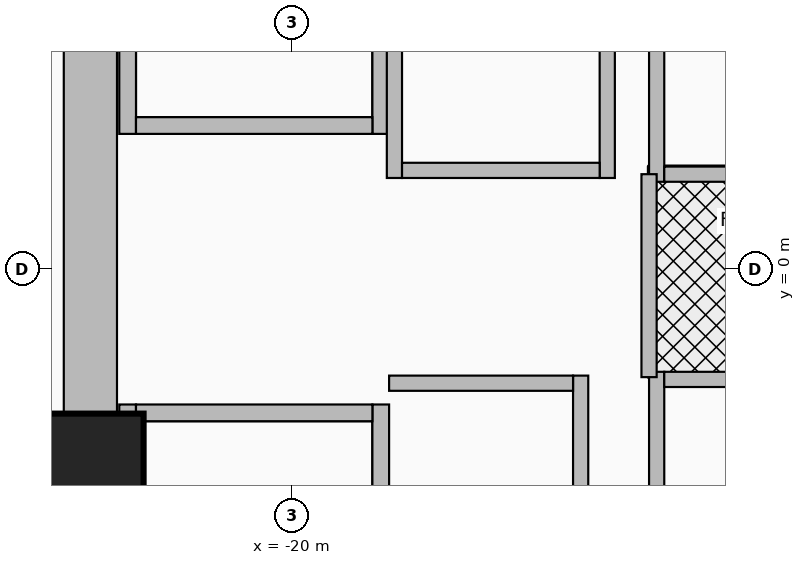
"""IFC4 building model, lengths in metres.
Left out: names, types, materials, properties, quantities, classifications, styles, units other than length and angle.
Written with IfcOpenShell. Run it as: python <this file> out.ifc"""

import sys

from ifc_helpers import new_model, si_unit, direction, frame, frame_2d, origin, origin_2d, place, context, subcontext, project, spatial, rectangle, extrude, source, transform, mapped, element, fill, save


model = new_model("IFC4")
c1 = context("Model", 3, precision=1e-05, world=origin(), true_north=direction((0.0, 1.0)))
c2 = subcontext(c1, "Body", "Model", "MODEL_VIEW")
j1 = project(units=[si_unit("LENGTHUNIT", "METRE"), si_unit("PLANEANGLEUNIT", "RADIAN")], contexts=[c1])
p1 = place(None, origin())
s1 = spatial("IfcSite", under=j1, at=p1, CompositionType="ELEMENT")
p2 = place(p1, origin())
s2 = spatial("IfcBuilding", under=s1, at=p2, CompositionType="ELEMENT")
p3 = place(p2, frame((0.0, 0.0, 20.8)))
s3 = spatial("IfcBuildingStorey", under=s2, at=p3, CompositionType="ELEMENT", Elevation=20.8)
for number, where, z_axis, x_axis in (
    (1, (-22.16, 1.78, 0.0), (0.0, 0.0, 1.0), (0.0, 1.0, 0.0)),
    (2, (-18.83, 1.78, 0.0), (0.0, 0.0, 1.0), (0.0, 1.0, 0.0)),
):
    element("IfcWall", number, at=place(p3, frame(where, z_axis=z_axis, x_axis=x_axis)), inside=s3, PredefinedType="SHEAR", context=c2, shape_type="SweptSolid", body=[
        extrude(rectangle(XDim=8.67, YDim=0.22, at=frame_2d((4.335, 0.0))), origin(), (0.0, 0.0, 1.0), 4.96),
    ])
p4 = place(p3, frame((-22.05, 1.89, 0.0), z_axis=(0.0, 0.0, 1.0), x_axis=(1.0, 0.0, 0.0)))
e3 = element("IfcWall", 3, at=p4, inside=s3, PredefinedType="SHEAR", context=c2, shape_type="SweptSolid", body=[
    extrude(rectangle(XDim=3.11, YDim=0.22, at=frame_2d((1.555, 0.0))), origin(), (0.0, 0.0, 1.0), 4.96),
])
p5 = place(p4, frame((1.0, 0.0, 0.0)))
e4 = element("IfcOpeningElement", 4, at=p5, cuts=e3, PredefinedType="OPENING", context=c2, shape_type="SweptSolid", body=[
    extrude(rectangle(XDim=1.1, YDim=2.15, at=frame_2d((0.55, 1.075))), frame((0.0, 0.125, 0.0), z_axis=(0.0, -1.0, 0.0), x_axis=(1.0, 0.0, 0.0)), (0.0, 0.0, 1.0), 0.25),
])
for number, where, z_axis, x_axis in (
    (5, (-22.16, -10.45, 0.0), (0.0, 0.0, 1.0), (0.0, 1.0, 0.0)),
    (6, (-18.83, -10.45, 0.0), (0.0, 0.0, 1.0), (0.0, 1.0, 0.0)),
):
    element("IfcWall", number, at=place(p3, frame(where, z_axis=z_axis, x_axis=x_axis)), inside=s3, PredefinedType="SHEAR", context=c2, shape_type="SweptSolid", body=[
        extrude(rectangle(XDim=8.67, YDim=0.22, at=frame_2d((4.335, 0.0))), origin(), (0.0, 0.0, 1.0), 4.96),
    ])
p6 = place(p3, frame((-22.05, -1.89, 0.0), z_axis=(0.0, 0.0, 1.0), x_axis=(1.0, 0.0, 0.0)))
e7 = element("IfcWall", 7, at=p6, inside=s3, PredefinedType="SHEAR", context=c2, shape_type="SweptSolid", body=[
    extrude(rectangle(XDim=3.11, YDim=0.22, at=frame_2d((1.555, 0.0))), origin(), (0.0, 0.0, 1.0), 4.96),
])
p7 = place(p6, frame((1.0, 0.0, 0.0)))
e8 = element("IfcOpeningElement", 8, at=p7, cuts=e7, PredefinedType="OPENING", context=c2, shape_type="SweptSolid", body=[
    extrude(rectangle(XDim=1.1, YDim=2.15, at=frame_2d((0.55, 1.075))), frame((0.0, 0.125, 0.0), z_axis=(0.0, -1.0, 0.0), x_axis=(1.0, 0.0, 0.0)), (0.0, 0.0, 1.0), 0.25),
])
p8 = place(p3, frame((-22.65, -11.15, 0.0), z_axis=(0.0, 0.0, 1.0), x_axis=(0.0, 1.0, 0.0)))
e9 = element("IfcWall", 9, at=p8, inside=s3, PredefinedType="SHEAR", context=c2, shape_type="SweptSolid", body=[
    extrude(rectangle(XDim=22.3, YDim=0.7, at=frame_2d((11.15, 0.0))), origin(), (0.0, 0.0, 1.0), 4.96),
])
m1 = source(origin(), c2, "Body", "SweptSolid", [
    extrude(rectangle(XDim=1.4, YDim=1.4, at=origin_2d()), origin(), (0.0, 0.0, 1.0), 5.2),
])
p9 = place(p3, frame((-22.65, -2.6, 0.0), z_axis=(0.0, 0.0, 1.0), x_axis=(1.0, 0.0, 0.0)))
e10 = element("IfcColumn", 10, at=p9, inside=s3, PredefinedType="COLUMN", context=c2, shape_type="MappedRepresentation", body=[
    mapped(m1, transform((0.0, 0.0, 0.0), x_axis=(1.0, 0.0, 0.0), y_axis=(0.0, 1.0, 0.0), z_axis=(0.0, 0.0, 1.0), scale=1.0)),
])
for number, where, z_axis, x_axis in (
    (11, (-18.65, 1.2, 0.0), (0.0, 0.0, 1.0), (0.0, 1.0, 0.0)),
    (12, (-15.85, 1.2, 0.0), (0.0, 0.0, 1.0), (0.0, 1.0, 0.0)),
):
    element("IfcWall", number, at=place(p3, frame(where, z_axis=z_axis, x_axis=x_axis)), inside=s3, PredefinedType="MOVABLE", context=c2, shape_type="SweptSolid", body=[
        extrude(rectangle(XDim=3.225, YDim=0.2, at=frame_2d((1.613, 0.0))), origin(), (0.0, 0.0, 1.0), 4.96),
    ])
p10 = place(p3, frame((-18.55, 1.3, 0.0), z_axis=(0.0, 0.0, 1.0), x_axis=(1.0, 0.0, 0.0)))
e13 = element("IfcWall", 13, at=p10, inside=s3, PredefinedType="MOVABLE", context=c2, shape_type="SweptSolid", body=[
    extrude(rectangle(XDim=2.6, YDim=0.2, at=frame_2d((1.3, 0.0))), origin(), (0.0, 0.0, 1.0), 4.96),
])
p11 = place(p10, frame((0.7, 0.0, 0.0)))
e14 = element("IfcOpeningElement", 14, at=p11, cuts=e13, PredefinedType="OPENING", context=c2, shape_type="SweptSolid", body=[
    extrude(rectangle(XDim=1.2, YDim=2.1, at=frame_2d((0.6, 1.05))), frame((0.0, 0.115, 0.0), z_axis=(0.0, -1.0, 0.0), x_axis=(1.0, 0.0, 0.0)), (0.0, 0.0, 1.0), 0.23),
])
p12 = place(p3, frame((-16.2, -4.6, 0.0), z_axis=(0.0, 0.0, 1.0), x_axis=(0.0, 1.0, 0.0)))
e15 = element("IfcWall", 15, at=p12, inside=s3, PredefinedType="MOVABLE", context=c2, shape_type="SweptSolid", body=[
    extrude(rectangle(XDim=3.2, YDim=0.2, at=frame_2d((1.6, 0.0))), origin(), (0.0, 0.0, 1.0), 4.96),
])
p13 = place(p3, frame((-18.72, -1.5, 0.0), z_axis=(0.0, 0.0, 1.0), x_axis=(1.0, 0.0, 0.0)))
e16 = element("IfcWall", 16, at=p13, inside=s3, PredefinedType="MOVABLE", context=c2, shape_type="SweptSolid", body=[
    extrude(rectangle(XDim=2.42, YDim=0.2, at=frame_2d((1.21, 0.0))), origin(), (0.0, 0.0, 1.0), 4.96),
])
p14 = place(p13, frame((0.61, 0.0, 0.0)))
e17 = element("IfcOpeningElement", 17, at=p14, cuts=e16, PredefinedType="OPENING", context=c2, shape_type="SweptSolid", body=[
    extrude(rectangle(XDim=1.2, YDim=2.1, at=frame_2d((0.6, 1.05))), frame((0.0, 0.115, 0.0), z_axis=(0.0, -1.0, 0.0), x_axis=(1.0, 0.0, 0.0)), (0.0, 0.0, 1.0), 0.23),
])
p15 = place(p3, frame((-15.2, 1.15, 0.0), z_axis=(0.0, 0.0, 1.0), x_axis=(0.0, 1.0, 0.0)))
e18 = element("IfcWall", 18, at=p15, inside=s3, PredefinedType="MOVABLE", context=c2, shape_type="SweptSolid", body=[
    extrude(rectangle(XDim=2.25, YDim=0.2, at=frame_2d((1.125, 0.0))), origin(), (0.0, 0.0, 1.0), 4.96),
])
p16 = place(p3, frame((-15.1, 1.25, 0.0), z_axis=(0.0, 0.0, 1.0), x_axis=(1.0, 0.0, 0.0)))
e19 = element("IfcWall", 19, at=p16, inside=s3, PredefinedType="MOVABLE", context=c2, shape_type="SweptSolid", body=[
    extrude(rectangle(XDim=1.92, YDim=0.2, at=frame_2d((0.96, 0.0))), origin(), (0.0, 0.0, 1.0), 4.96),
])
p17 = place(p3, frame((-15.2, -3.7, 0.0), z_axis=(0.0, 0.0, 1.0), x_axis=(0.0, 1.0, 0.0)))
e20 = element("IfcWall", 20, at=p17, inside=s3, PredefinedType="MOVABLE", context=c2, shape_type="SweptSolid", body=[
    extrude(rectangle(XDim=2.35, YDim=0.2, at=frame_2d((1.175, 0.0))), origin(), (0.0, 0.0, 1.0), 4.96),
])
p18 = place(p3, frame((-15.1, -1.45, 0.0), z_axis=(0.0, 0.0, 1.0), x_axis=(1.0, 0.0, 0.0)))
e21 = element("IfcWall", 21, at=p18, inside=s3, PredefinedType="MOVABLE", context=c2, shape_type="SweptSolid", body=[
    extrude(rectangle(XDim=1.92, YDim=0.2, at=frame_2d((0.96, 0.0))), origin(), (0.0, 0.0, 1.0), 4.96),
])
p19 = place(p3, frame((-15.3, -1.42, 0.0), z_axis=(0.0, 0.0, 1.0), x_axis=(0.0, 1.0, 0.0)))
e22 = element("IfcWall", 22, at=p19, inside=s3, PredefinedType="PARTITIONING", context=c2, shape_type="SweptSolid", body=[
    extrude(rectangle(XDim=2.67, YDim=0.2, at=frame_2d((1.335, 0.0))), origin(), (0.0, 0.0, 1.0), 4.96),
])
p20 = place(p19, frame((0.78, 0.0, 0.0)))
e23 = element("IfcOpeningElement", 23, at=p20, cuts=e22, PredefinedType="OPENING", context=c2, shape_type="SweptSolid", body=[
    extrude(rectangle(XDim=1.05, YDim=2.15, at=frame_2d((0.525, 1.075))), frame((0.0, 0.115, 0.0), z_axis=(0.0, -1.0, 0.0), x_axis=(1.0, 0.0, 0.0)), (0.0, 0.0, 1.0), 0.23),
])
p21 = place(p11, origin())
e24 = element("IfcDoor", 24, at=p21, inside=s3, OperationType="DOUBLE_DOOR_SLIDING", PredefinedType="DOOR", context=c2, shape_type="SweptSolid", body=[
    extrude(rectangle(XDim=1.2, YDim=2.1, at=frame_2d((0.6, 1.05))), frame((0.0, 0.025, 0.0), z_axis=(0.0, -1.0, 0.0), x_axis=(1.0, 0.0, 0.0)), (0.0, 0.0, 1.0), 0.05),
])
fill(e14, e24)
p22 = place(p14, origin())
e25 = element("IfcDoor", 25, at=p22, inside=s3, OperationType="DOUBLE_DOOR_SLIDING", PredefinedType="DOOR", context=c2, shape_type="SweptSolid", body=[
    extrude(rectangle(XDim=1.2, YDim=2.1, at=frame_2d((0.6, 1.05))), frame((0.0, 0.025, 0.0), z_axis=(0.0, -1.0, 0.0), x_axis=(1.0, 0.0, 0.0)), (0.0, 0.0, 1.0), 0.05),
])
fill(e17, e25)
p23 = place(p20, origin())
e26 = element("IfcDoor", 26, at=p23, inside=s3, OperationType="SINGLE_SWING_RIGHT", PredefinedType="DOOR", context=c2, shape_type="SweptSolid", body=[
    extrude(rectangle(XDim=1.05, YDim=2.15, at=frame_2d((0.525, 1.075))), frame((0.0, 0.025, 0.0), z_axis=(0.0, -1.0, 0.0), x_axis=(1.0, 0.0, 0.0)), (0.0, 0.0, 1.0), 0.05),
])
fill(e23, e26)
p24 = place(p5, frame((1.1, 0.0, 0.0), z_axis=(0.0, 0.0, 1.0), x_axis=(-1.0, 0.0, 0.0)))
e27 = element("IfcDoor", 27, at=p24, inside=s3, OperationType="SINGLE_SWING_LEFT", PredefinedType="DOOR", context=c2, shape_type="SweptSolid", body=[
    extrude(rectangle(XDim=1.1, YDim=2.15, at=frame_2d((0.55, 1.075))), frame((0.0, 0.025, 0.0), z_axis=(0.0, -1.0, 0.0), x_axis=(1.0, 0.0, 0.0)), (0.0, 0.0, 1.0), 0.05),
])
fill(e4, e27)
p25 = place(p7, origin())
e28 = element("IfcDoor", 28, at=p25, inside=s3, OperationType="SINGLE_SWING_RIGHT", PredefinedType="DOOR", context=c2, shape_type="SweptSolid", body=[
    extrude(rectangle(XDim=1.1, YDim=2.15, at=frame_2d((0.55, 1.075))), frame((0.0, 0.025, 0.0), z_axis=(0.0, -1.0, 0.0), x_axis=(1.0, 0.0, 0.0)), (0.0, 0.0, 1.0), 0.05),
])
fill(e8, e28)
save(model, sys.argv[1])
